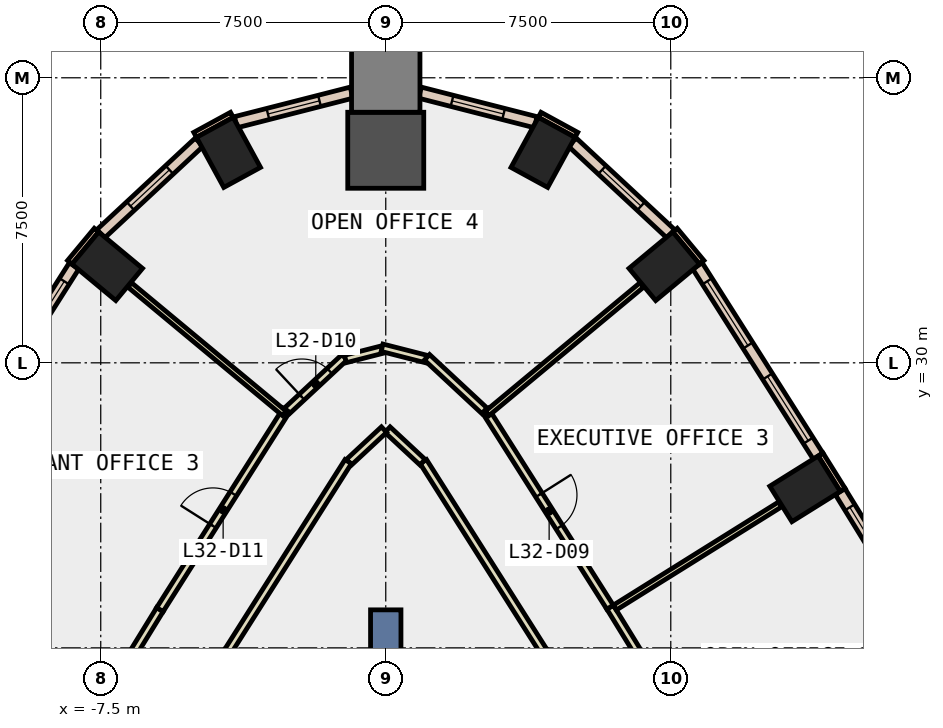
"""IFC4 building model, lengths in metres.
Left out: names, types, materials, properties, quantities, classifications, styles, units other than length and angle.
Written with IfcOpenShell. Run it as: python <this file> out.ifc"""

import sys

from ifc_helpers import new_model, si_unit, direction, frame, frame_2d, origin, origin_2d, place, context, subcontext, project, spatial, rectangle, extrude, element, fill, save


model = new_model("IFC4")
c1 = context("Model", 3, precision=1e-05, world=origin(), true_north=direction((0.0, 1.0)))
c2 = subcontext(c1, "Body", "Model", "MODEL_VIEW")
j1 = project(units=[si_unit("LENGTHUNIT", "METRE"), si_unit("PLANEANGLEUNIT", "RADIAN")], contexts=[c1])
p1 = place(None, origin())
s1 = spatial("IfcSite", under=j1, at=p1, CompositionType="ELEMENT")
p2 = place(p1, origin())
s2 = spatial("IfcBuilding", under=s1, at=p2, CompositionType="ELEMENT")
p3 = place(p2, frame((0.0, 0.0, 146.6)))
s3 = spatial("IfcBuildingStorey", under=s2, at=p3, CompositionType="ELEMENT", Elevation=146.6)
for number, where, z_axis, x_axis in (
    (1, (11.033, 26.684, -0.4), (0.0, 0.0, 1.0), (-0.53, 0.848, 0.0)),
    (2, (7.329, 32.541, -0.4), (0.0, 0.0, 1.0), (-0.639, 0.769, 0.0)),
    (3, (4.138, 35.537, -0.4), (0.0, 0.0, 1.0), (-0.878, 0.479, 0.0)),
):
    element("IfcColumn", number, at=place(p3, frame(where, z_axis=z_axis, x_axis=x_axis)), inside=s3, PredefinedType="COLUMN", context=c2, shape_type="SweptSolid", body=[
        extrude(rectangle(XDim=1.1, YDim=1.5, at=origin_2d()), origin(), (0.0, 0.0, 1.0), 4.2),
    ])
p4 = place(p3, frame((0.0, 35.593, -0.4), z_axis=(0.0, 0.0, 1.0), x_axis=(0.0, 1.0, 0.0)))
e4 = element("IfcColumn", 4, at=p4, inside=s3, PredefinedType="COLUMN", context=c2, shape_type="SweptSolid", body=[
    extrude(rectangle(XDim=2.0, YDim=2.0, at=origin_2d()), origin(), (0.0, 0.0, 1.0), 4.2),
])
for number, where, z_axis, x_axis in (
    (5, (-4.138, 35.537, -0.4), (0.0, 0.0, 1.0), (0.878, 0.479, 0.0)),
    (6, (-7.329, 32.541, -0.4), (0.0, 0.0, 1.0), (0.639, 0.769, 0.0)),
):
    element("IfcColumn", number, at=place(p3, frame(where, z_axis=z_axis, x_axis=x_axis)), inside=s3, PredefinedType="COLUMN", context=c2, shape_type="SweptSolid", body=[
        extrude(rectangle(XDim=1.1, YDim=1.5, at=origin_2d()), origin(), (0.0, 0.0, 1.0), 4.2),
    ])
p5 = place(p3, frame((0.0, 37.493, -0.4), z_axis=(0.0, 0.0, 1.0), x_axis=(0.0, 1.0, 0.0)))
e7 = element("IfcColumn", 7, at=p5, inside=s3, PredefinedType="COLUMN", context=c2, shape_type="SweptSolid", body=[
    extrude(rectangle(XDim=1.8, YDim=1.8, at=origin_2d()), origin(), (0.0, 0.0, 1.0), 4.2),
])
p6 = place(p3, frame((0.0, 14.5, -0.4), z_axis=(0.0, 0.0, 1.0), x_axis=(0.0, 1.0, 0.0)))
e8 = element("IfcWall", 8, at=p6, inside=s3, PredefinedType="SHEAR", context=c2, shape_type="SweptSolid", body=[
    extrude(rectangle(XDim=9.0, YDim=0.8, at=frame_2d((4.5, 0.0))), origin(), (0.0, 0.0, 1.0), 4.2),
])
for number, where, z_axis, x_axis in (
    (9, (5.016, 35.998, 0.0), (0.0, 0.0, 1.0), (-0.878, 0.479, 0.0)),
    (10, (-4.05, 36.525, 0.0), (0.0, 0.0, 1.0), (-0.878, -0.479, 0.0)),
):
    element("IfcWall", number, at=place(p3, frame(where, z_axis=z_axis, x_axis=x_axis)), inside=s3, PredefinedType="STANDARD", context=c2, shape_type="SweptSolid", body=[
        extrude(rectangle(XDim=1.1, YDim=0.15, at=frame_2d((0.55, 0.0))), origin(), (0.0, 0.0, 1.0), 3.8),
    ])
p7 = place(p3, frame((12.024, 26.655, 0.0), z_axis=(0.0, 0.0, 1.0), x_axis=(-0.52997899071, 0.848010771987, 0.0)))
e11 = element("IfcWall", 11, at=p7, inside=s3, PredefinedType="STANDARD", context=c2, shape_type="SweptSolid", body=[
    extrude(rectangle(XDim=1.1, YDim=0.15, at=frame_2d((0.55, 0.0))), origin(), (0.0, 0.0, 1.0), 3.8),
])
for number, where, z_axis, x_axis in (
    (12, (8.315, 32.645, 0.0), (0.0, 0.0, 1.0), (-0.639, 0.769, 0.0)),
    (13, (-7.612, 33.491, 0.0), (0.0, 0.0, 1.0), (-0.639, -0.769, 0.0)),
):
    element("IfcWall", number, at=place(p3, frame(where, z_axis=z_axis, x_axis=x_axis)), inside=s3, PredefinedType="STANDARD", context=c2, shape_type="SweptSolid", body=[
        extrude(rectangle(XDim=1.1, YDim=0.15, at=frame_2d((0.55, 0.0))), origin(), (0.0, 0.0, 1.0), 3.8),
    ])
p8 = place(p3, frame((15.073, 21.544, 0.0), z_axis=(0.0, 0.0, 1.0), x_axis=(-0.523719731127, 0.851890628677, 0.0)))
e14 = element("IfcWall", 14, at=p8, inside=s3, PredefinedType="STANDARD", context=c2, shape_type="SweptSolid", body=[
    extrude(rectangle(XDim=5.952, YDim=0.3, at=frame_2d((2.976, 0.0))), origin(), (0.0, 0.0, 1.0), 3.8),
])
p9 = place(p8, frame((0.488, 0.0, 0.9)))
e15 = element("IfcOpeningElement", 15, at=p9, cuts=e14, PredefinedType="OPENING", context=c2, shape_type="SweptSolid", body=[
    extrude(rectangle(XDim=2.0, YDim=2.6, at=frame_2d((1.0, 1.3))), frame((0.0, 0.16, 0.0), z_axis=(0.0, -1.0, 0.0), x_axis=(1.0, 0.0, 0.0)), (0.0, 0.0, 1.0), 0.32),
])
p10 = place(p8, frame((3.464, 0.0, 0.9)))
e16 = element("IfcOpeningElement", 16, at=p10, cuts=e14, PredefinedType="OPENING", context=c2, shape_type="SweptSolid", body=[
    extrude(rectangle(XDim=2.0, YDim=2.6, at=frame_2d((1.0, 1.3))), frame((0.0, 0.16, 0.0), z_axis=(0.0, -1.0, 0.0), x_axis=(1.0, 0.0, 0.0)), (0.0, 0.0, 1.0), 0.32),
])
p11 = place(p3, frame((11.375, 27.545, 0.0), z_axis=(0.0, 0.0, 1.0), x_axis=(-0.535403761464, 0.844596242124, 0.0)))
e17 = element("IfcWall", 17, at=p11, inside=s3, PredefinedType="STANDARD", context=c2, shape_type="SweptSolid", body=[
    extrude(rectangle(XDim=5.928, YDim=0.3, at=frame_2d((2.964, 0.0))), origin(), (0.0, 0.0, 1.0), 3.8),
])
p12 = place(p11, frame((0.482, 0.0, 0.9)))
e18 = element("IfcOpeningElement", 18, at=p12, cuts=e17, PredefinedType="OPENING", context=c2, shape_type="SweptSolid", body=[
    extrude(rectangle(XDim=2.0, YDim=2.6, at=frame_2d((1.0, 1.3))), frame((0.0, 0.16, 0.0), z_axis=(0.0, -1.0, 0.0), x_axis=(1.0, 0.0, 0.0)), (0.0, 0.0, 1.0), 0.32),
])
p13 = place(p11, frame((3.446, 0.0, 0.9)))
e19 = element("IfcOpeningElement", 19, at=p13, cuts=e17, PredefinedType="OPENING", context=c2, shape_type="SweptSolid", body=[
    extrude(rectangle(XDim=2.0, YDim=2.6, at=frame_2d((1.0, 1.3))), frame((0.0, 0.16, 0.0), z_axis=(0.0, -1.0, 0.0), x_axis=(1.0, 0.0, 0.0)), (0.0, 0.0, 1.0), 0.32),
])
p14 = place(p3, frame((7.499, 33.396, 0.0), z_axis=(0.0, 0.0, 1.0), x_axis=(-0.732121882671, 0.681173655475, 0.0)))
e20 = element("IfcWall", 20, at=p14, inside=s3, PredefinedType="STANDARD", context=c2, shape_type="SweptSolid", body=[
    extrude(rectangle(XDim=3.536, YDim=0.3, at=frame_2d((1.768, 0.0))), origin(), (0.0, 0.0, 1.0), 3.8),
])
p15 = place(p14, frame((1.068, 0.0, 0.9)))
e21 = element("IfcOpeningElement", 21, at=p15, cuts=e20, PredefinedType="OPENING", context=c2, shape_type="SweptSolid", body=[
    extrude(rectangle(XDim=1.4, YDim=2.6, at=frame_2d((0.7, 1.3))), frame((0.0, 0.16, 0.0), z_axis=(0.0, -1.0, 0.0), x_axis=(1.0, 0.0, 0.0)), (0.0, 0.0, 1.0), 0.32),
])
p16 = place(p3, frame((3.946, 36.331, 0.0), z_axis=(0.0, 0.0, 1.0), x_axis=(-0.968929586963, 0.247336724947, 0.0)))
e22 = element("IfcWall", 22, at=p16, inside=s3, PredefinedType="STANDARD", context=c2, shape_type="SweptSolid", body=[
    extrude(rectangle(XDim=3.145, YDim=0.3, at=frame_2d((1.572, 0.0))), origin(), (0.0, 0.0, 1.0), 3.8),
])
p17 = place(p16, frame((0.872, 0.0, 0.9)))
e23 = element("IfcOpeningElement", 23, at=p17, cuts=e22, PredefinedType="OPENING", context=c2, shape_type="SweptSolid", body=[
    extrude(rectangle(XDim=1.4, YDim=2.6, at=frame_2d((0.7, 1.3))), frame((0.0, 0.16, 0.0), z_axis=(0.0, -1.0, 0.0), x_axis=(1.0, 0.0, 0.0)), (0.0, 0.0, 1.0), 0.32),
])
p18 = place(p3, frame((-0.899, 37.109, 0.0), z_axis=(0.0, 0.0, 1.0), x_axis=(-0.968929586963, -0.247336724947, 0.0)))
e24 = element("IfcWall", 24, at=p18, inside=s3, PredefinedType="STANDARD", context=c2, shape_type="SweptSolid", body=[
    extrude(rectangle(XDim=3.145, YDim=0.3, at=frame_2d((1.572, 0.0))), origin(), (0.0, 0.0, 1.0), 3.8),
])
p19 = place(p18, frame((0.872, 0.0, 0.9)))
e25 = element("IfcOpeningElement", 25, at=p19, cuts=e24, PredefinedType="OPENING", context=c2, shape_type="SweptSolid", body=[
    extrude(rectangle(XDim=1.4, YDim=2.6, at=frame_2d((0.7, 1.3))), frame((0.0, 0.16, 0.0), z_axis=(0.0, -1.0, 0.0), x_axis=(1.0, 0.0, 0.0)), (0.0, 0.0, 1.0), 0.32),
])
p20 = place(p3, frame((-4.91, 35.805, 0.0), z_axis=(0.0, 0.0, 1.0), x_axis=(-0.732121882671, -0.681173655475, 0.0)))
e26 = element("IfcWall", 26, at=p20, inside=s3, PredefinedType="STANDARD", context=c2, shape_type="SweptSolid", body=[
    extrude(rectangle(XDim=3.536, YDim=0.3, at=frame_2d((1.768, 0.0))), origin(), (0.0, 0.0, 1.0), 3.8),
])
p21 = place(p20, frame((1.068, 0.0, 0.9)))
e27 = element("IfcOpeningElement", 27, at=p21, cuts=e26, PredefinedType="OPENING", context=c2, shape_type="SweptSolid", body=[
    extrude(rectangle(XDim=1.4, YDim=2.6, at=frame_2d((0.7, 1.3))), frame((0.0, 0.16, 0.0), z_axis=(0.0, -1.0, 0.0), x_axis=(1.0, 0.0, 0.0)), (0.0, 0.0, 1.0), 0.32),
])
p22 = place(p3, frame((-8.201, 32.552, 0.0), z_axis=(0.0, 0.0, 1.0), x_axis=(-0.535403761464, -0.844596242124, 0.0)))
e28 = element("IfcWall", 28, at=p22, inside=s3, PredefinedType="STANDARD", context=c2, shape_type="SweptSolid", body=[
    extrude(rectangle(XDim=5.928, YDim=0.3, at=frame_2d((2.964, 0.0))), origin(), (0.0, 0.0, 1.0), 3.8),
])
p23 = place(p22, frame((0.482, 0.0, 0.9)))
e29 = element("IfcOpeningElement", 29, at=p23, cuts=e28, PredefinedType="OPENING", context=c2, shape_type="SweptSolid", body=[
    extrude(rectangle(XDim=2.0, YDim=2.6, at=frame_2d((1.0, 1.3))), frame((0.0, 0.16, 0.0), z_axis=(0.0, -1.0, 0.0), x_axis=(1.0, 0.0, 0.0)), (0.0, 0.0, 1.0), 0.32),
])
p24 = place(p22, frame((3.446, 0.0, 0.9)))
e30 = element("IfcOpeningElement", 30, at=p24, cuts=e28, PredefinedType="OPENING", context=c2, shape_type="SweptSolid", body=[
    extrude(rectangle(XDim=2.0, YDim=2.6, at=frame_2d((1.0, 1.3))), frame((0.0, 0.16, 0.0), z_axis=(0.0, -1.0, 0.0), x_axis=(1.0, 0.0, 0.0)), (0.0, 0.0, 1.0), 0.32),
])
p25 = place(p3, frame((4.162, 22.395, 0.0), z_axis=(0.0, 0.0, 1.0), x_axis=(-0.535496886312, 0.844537201519, 0.0)))
e31 = element("IfcWall", 31, at=p25, inside=s3, PredefinedType="PARTITIONING", context=c2, shape_type="SweptSolid", body=[
    extrude(rectangle(XDim=5.927, YDim=0.2, at=frame_2d((2.964, 0.0))), origin(), (0.0, 0.0, 1.0), 3.8),
])
for number, where, z_axis, x_axis in (
    (32, (0.968, 27.385, 0.0), (0.0, 0.0, 1.0), (-0.733, 0.681, 0.0)),
    (33, (-0.046, 28.242, 0.0), (0.0, 0.0, 1.0), (-0.733, -0.681, 0.0)),
):
    element("IfcWall", number, at=place(p3, frame(where, z_axis=z_axis, x_axis=x_axis)), inside=s3, PredefinedType="PARTITIONING", context=c2, shape_type="SweptSolid", body=[
        extrude(rectangle(XDim=1.259, YDim=0.2, at=frame_2d((0.629, 0.0))), origin(), (0.0, 0.0, 1.0), 3.8),
    ])
p26 = place(p3, frame((-0.988, 27.401, 0.0), z_axis=(0.0, 0.0, 1.0), x_axis=(-0.535496886312, -0.844537201519, 0.0)))
e34 = element("IfcWall", 34, at=p26, inside=s3, PredefinedType="PARTITIONING", context=c2, shape_type="SweptSolid", body=[
    extrude(rectangle(XDim=5.927, YDim=0.2, at=frame_2d((2.964, 0.0))), origin(), (0.0, 0.0, 1.0), 3.8),
])
p27 = place(p3, frame((5.904, 23.571, 0.0), z_axis=(0.0, 0.0, 1.0), x_axis=(0.523647026552, -0.851935321244, 0.0)))
e35 = element("IfcWall", 35, at=p27, inside=s3, PredefinedType="PARTITIONING", context=c2, shape_type="SweptSolid", body=[
    extrude(rectangle(XDim=6.957, YDim=0.2, at=frame_2d((3.479, 0.0))), origin(), (0.0, 0.0, 1.0), 3.8),
])
p28 = place(p27, frame((3.053, 0.0, 0.0)))
e36 = element("IfcOpeningElement", 36, at=p28, cuts=e35, PredefinedType="OPENING", context=c2, shape_type="SweptSolid", body=[
    extrude(rectangle(XDim=1.0, YDim=2.1, at=frame_2d((0.5, 1.05))), frame((0.0, 0.11, 0.0), z_axis=(0.0, -1.0, 0.0), x_axis=(1.0, 0.0, 0.0)), (0.0, 0.0, 1.0), 0.22),
])
p29 = place(p3, frame((2.616, 28.754, 0.0), z_axis=(0.0, 0.0, 1.0), x_axis=(0.535405016332, -0.844595446641, 0.0)))
e37 = element("IfcWall", 37, at=p29, inside=s3, PredefinedType="PARTITIONING", context=c2, shape_type="SweptSolid", body=[
    extrude(rectangle(XDim=6.138, YDim=0.2, at=frame_2d((3.069, 0.0))), origin(), (0.0, 0.0, 1.0), 3.8),
])
p30 = place(p29, frame((2.644, 0.0, 0.0)))
e38 = element("IfcOpeningElement", 38, at=p30, cuts=e37, PredefinedType="OPENING", context=c2, shape_type="SweptSolid", body=[
    extrude(rectangle(XDim=1.0, YDim=2.1, at=frame_2d((0.5, 1.05))), frame((0.0, 0.11, 0.0), z_axis=(0.0, -1.0, 0.0), x_axis=(1.0, 0.0, 0.0)), (0.0, 0.0, 1.0), 0.22),
])
p31 = place(p3, frame((-2.597, 28.738, 0.0), z_axis=(0.0, 0.0, 1.0), x_axis=(0.73206471367, 0.681235095249, 0.0)))
e39 = element("IfcWall", 39, at=p31, inside=s3, PredefinedType="PARTITIONING", context=c2, shape_type="SweptSolid", body=[
    extrude(rectangle(XDim=2.065, YDim=0.2, at=frame_2d((1.033, 0.0))), origin(), (0.0, 0.0, 1.0), 3.8),
])
p32 = place(p31, frame((0.532, 0.0, 0.0)))
e40 = element("IfcOpeningElement", 40, at=p32, cuts=e39, PredefinedType="OPENING", context=c2, shape_type="SweptSolid", body=[
    extrude(rectangle(XDim=1.0, YDim=2.1, at=frame_2d((0.5, 1.05))), frame((0.0, 0.11, 0.0), z_axis=(0.0, -1.0, 0.0), x_axis=(1.0, 0.0, 0.0)), (0.0, 0.0, 1.0), 0.22),
])
p33 = place(p3, frame((-1.061, 30.101, 0.0), z_axis=(0.0, 0.0, 1.0), x_axis=(0.968991499392, 0.247094059227, 0.0)))
e41 = element("IfcWall", 41, at=p33, inside=s3, PredefinedType="PARTITIONING", context=c2, shape_type="SweptSolid", body=[
    extrude(rectangle(XDim=0.995, YDim=0.2, at=frame_2d((0.498, 0.0))), origin(), (0.0, 0.0, 1.0), 3.8),
])
p34 = place(p3, frame((-0.097, 30.397, 0.0), z_axis=(0.0, 0.0, 1.0), x_axis=(0.968867686006, -0.247579092439, 0.0)))
e42 = element("IfcWall", 42, at=p34, inside=s3, PredefinedType="PARTITIONING", context=c2, shape_type="SweptSolid", body=[
    extrude(rectangle(XDim=1.195, YDim=0.2, at=frame_2d((0.598, 0.0))), origin(), (0.0, 0.0, 1.0), 3.8),
])
p35 = place(p3, frame((1.085, 30.145, 0.0), z_axis=(0.0, 0.0, 1.0), x_axis=(0.73206471367, -0.681235095249, 0.0)))
e43 = element("IfcWall", 43, at=p35, inside=s3, PredefinedType="PARTITIONING", context=c2, shape_type="SweptSolid", body=[
    extrude(rectangle(XDim=2.065, YDim=0.2, at=frame_2d((1.033, 0.0))), origin(), (0.0, 0.0, 1.0), 3.8),
])
p36 = place(p3, frame((-7.725, 20.608, 0.0), z_axis=(0.0, 0.0, 1.0), x_axis=(0.523645038298, 0.851936543333, 0.0)))
e44 = element("IfcWall", 44, at=p36, inside=s3, PredefinedType="PARTITIONING", context=c2, shape_type="SweptSolid", body=[
    extrude(rectangle(XDim=3.403, YDim=0.2, at=frame_2d((1.702, 0.0))), origin(), (0.0, 0.0, 1.0), 3.8),
])
p37 = place(p3, frame((-5.943, 23.507, 0.0), z_axis=(0.0, 0.0, 1.0), x_axis=(0.535529721247, 0.844516380931, 0.0)))
e45 = element("IfcWall", 45, at=p37, inside=s3, PredefinedType="PARTITIONING", context=c2, shape_type="SweptSolid", body=[
    extrude(rectangle(XDim=6.213, YDim=0.2, at=frame_2d((3.106, 0.0))), origin(), (0.0, 0.0, 1.0), 3.8),
])
p38 = place(p37, frame((2.607, 0.0, 0.0)))
e46 = element("IfcOpeningElement", 46, at=p38, cuts=e45, PredefinedType="OPENING", context=c2, shape_type="SweptSolid", body=[
    extrude(rectangle(XDim=1.0, YDim=2.1, at=frame_2d((0.5, 1.05))), frame((0.0, 0.11, 0.0), z_axis=(0.0, -1.0, 0.0), x_axis=(1.0, 0.0, 0.0)), (0.0, 0.0, 1.0), 0.22),
])
p39 = place(p3, frame((6.028, 23.56, 0.0), z_axis=(0.0, 0.0, 1.0), x_axis=(0.848246841914, 0.529601071734, 0.0)))
e47 = element("IfcWall", 47, at=p39, inside=s3, PredefinedType="PARTITIONING", context=c2, shape_type="SweptSolid", body=[
    extrude(rectangle(XDim=5.13, YDim=0.15, at=frame_2d((2.565, 0.0))), origin(), (0.0, 0.0, 1.0), 3.8),
])
for number, where, z_axis, x_axis in (
    (48, (2.67, 28.67, 0.0), (0.0, 0.0, 1.0), (0.769, 0.639, 0.0)),
    (49, (-2.67, 28.67, 0.0), (0.0, 0.0, 1.0), (-0.769, 0.639, 0.0)),
):
    element("IfcWall", number, at=place(p3, frame(where, z_axis=z_axis, x_axis=x_axis)), inside=s3, PredefinedType="PARTITIONING", context=c2, shape_type="SweptSolid", body=[
        extrude(rectangle(XDim=5.288, YDim=0.15, at=frame_2d((2.644, 0.0))), origin(), (0.0, 0.0, 1.0), 3.8),
    ])
p40 = place(p3, frame((-7.679, 20.492, 0.0), z_axis=(0.0, 0.0, 1.0), x_axis=(-0.851897179877, 0.523709074695, 0.0)))
e50 = element("IfcWall", 50, at=p40, inside=s3, PredefinedType="PARTITIONING", context=c2, shape_type="SweptSolid", body=[
    extrude(rectangle(XDim=6.7, YDim=0.15, at=frame_2d((3.35, 0.0))), origin(), (0.0, 0.0, 1.0), 3.8),
])
p41 = place(p10, origin())
e51 = element("IfcWindow", 51, at=p41, inside=s3, PartitioningType="SINGLE_PANEL", PredefinedType="WINDOW", context=c2, shape_type="SweptSolid", body=[
    extrude(rectangle(XDim=2.0, YDim=2.6, at=frame_2d((1.0, 1.3))), frame((0.0, 0.03, 0.0), z_axis=(0.0, -1.0, 0.0), x_axis=(1.0, 0.0, 0.0)), (0.0, 0.0, 1.0), 0.06),
])
fill(e16, e51)
p42 = place(p12, origin())
e52 = element("IfcWindow", 52, at=p42, inside=s3, PartitioningType="SINGLE_PANEL", PredefinedType="WINDOW", context=c2, shape_type="SweptSolid", body=[
    extrude(rectangle(XDim=2.0, YDim=2.6, at=frame_2d((1.0, 1.3))), frame((0.0, 0.03, 0.0), z_axis=(0.0, -1.0, 0.0), x_axis=(1.0, 0.0, 0.0)), (0.0, 0.0, 1.0), 0.06),
])
fill(e18, e52)
p43 = place(p13, origin())
e53 = element("IfcWindow", 53, at=p43, inside=s3, PartitioningType="SINGLE_PANEL", PredefinedType="WINDOW", context=c2, shape_type="SweptSolid", body=[
    extrude(rectangle(XDim=2.0, YDim=2.6, at=frame_2d((1.0, 1.3))), frame((0.0, 0.03, 0.0), z_axis=(0.0, -1.0, 0.0), x_axis=(1.0, 0.0, 0.0)), (0.0, 0.0, 1.0), 0.06),
])
fill(e19, e53)
p44 = place(p15, origin())
e54 = element("IfcWindow", 54, at=p44, inside=s3, PartitioningType="SINGLE_PANEL", PredefinedType="WINDOW", context=c2, shape_type="SweptSolid", body=[
    extrude(rectangle(XDim=1.4, YDim=2.6, at=frame_2d((0.7, 1.3))), frame((0.0, 0.03, 0.0), z_axis=(0.0, -1.0, 0.0), x_axis=(1.0, 0.0, 0.0)), (0.0, 0.0, 1.0), 0.06),
])
fill(e21, e54)
p45 = place(p17, origin())
e55 = element("IfcWindow", 55, at=p45, inside=s3, PartitioningType="SINGLE_PANEL", PredefinedType="WINDOW", context=c2, shape_type="SweptSolid", body=[
    extrude(rectangle(XDim=1.4, YDim=2.6, at=frame_2d((0.7, 1.3))), frame((0.0, 0.03, 0.0), z_axis=(0.0, -1.0, 0.0), x_axis=(1.0, 0.0, 0.0)), (0.0, 0.0, 1.0), 0.06),
])
fill(e23, e55)
p46 = place(p19, origin())
e56 = element("IfcWindow", 56, at=p46, inside=s3, PartitioningType="SINGLE_PANEL", PredefinedType="WINDOW", context=c2, shape_type="SweptSolid", body=[
    extrude(rectangle(XDim=1.4, YDim=2.6, at=frame_2d((0.7, 1.3))), frame((0.0, 0.03, 0.0), z_axis=(0.0, -1.0, 0.0), x_axis=(1.0, 0.0, 0.0)), (0.0, 0.0, 1.0), 0.06),
])
fill(e25, e56)
p47 = place(p21, origin())
e57 = element("IfcWindow", 57, at=p47, inside=s3, PartitioningType="SINGLE_PANEL", PredefinedType="WINDOW", context=c2, shape_type="SweptSolid", body=[
    extrude(rectangle(XDim=1.4, YDim=2.6, at=frame_2d((0.7, 1.3))), frame((0.0, 0.03, 0.0), z_axis=(0.0, -1.0, 0.0), x_axis=(1.0, 0.0, 0.0)), (0.0, 0.0, 1.0), 0.06),
])
fill(e27, e57)
p48 = place(p23, origin())
e58 = element("IfcWindow", 58, at=p48, inside=s3, PartitioningType="SINGLE_PANEL", PredefinedType="WINDOW", context=c2, shape_type="SweptSolid", body=[
    extrude(rectangle(XDim=2.0, YDim=2.6, at=frame_2d((1.0, 1.3))), frame((0.0, 0.03, 0.0), z_axis=(0.0, -1.0, 0.0), x_axis=(1.0, 0.0, 0.0)), (0.0, 0.0, 1.0), 0.06),
])
fill(e29, e58)
p49 = place(p30, origin())
e59 = element("IfcDoor", 59, at=p49, inside=s3, OperationType="SINGLE_SWING_LEFT", PredefinedType="DOOR", context=c2, shape_type="SweptSolid", body=[
    extrude(rectangle(XDim=1.0, YDim=2.1, at=frame_2d((0.5, 1.05))), frame((0.0, 0.025, 0.0), z_axis=(0.0, -1.0, 0.0), x_axis=(1.0, 0.0, 0.0)), (0.0, 0.0, 1.0), 0.05),
])
fill(e38, e59)
p50 = place(p32, origin())
e60 = element("IfcDoor", 60, at=p50, inside=s3, OperationType="SINGLE_SWING_LEFT", PredefinedType="DOOR", context=c2, shape_type="SweptSolid", body=[
    extrude(rectangle(XDim=1.0, YDim=2.1, at=frame_2d((0.5, 1.05))), frame((0.0, 0.025, 0.0), z_axis=(0.0, -1.0, 0.0), x_axis=(1.0, 0.0, 0.0)), (0.0, 0.0, 1.0), 0.05),
])
fill(e40, e60)
p51 = place(p38, origin())
e61 = element("IfcDoor", 61, at=p51, inside=s3, OperationType="SINGLE_SWING_LEFT", PredefinedType="DOOR", context=c2, shape_type="SweptSolid", body=[
    extrude(rectangle(XDim=1.0, YDim=2.1, at=frame_2d((0.5, 1.05))), frame((0.0, 0.025, 0.0), z_axis=(0.0, -1.0, 0.0), x_axis=(1.0, 0.0, 0.0)), (0.0, 0.0, 1.0), 0.05),
])
fill(e46, e61)
save(model, sys.argv[1])
